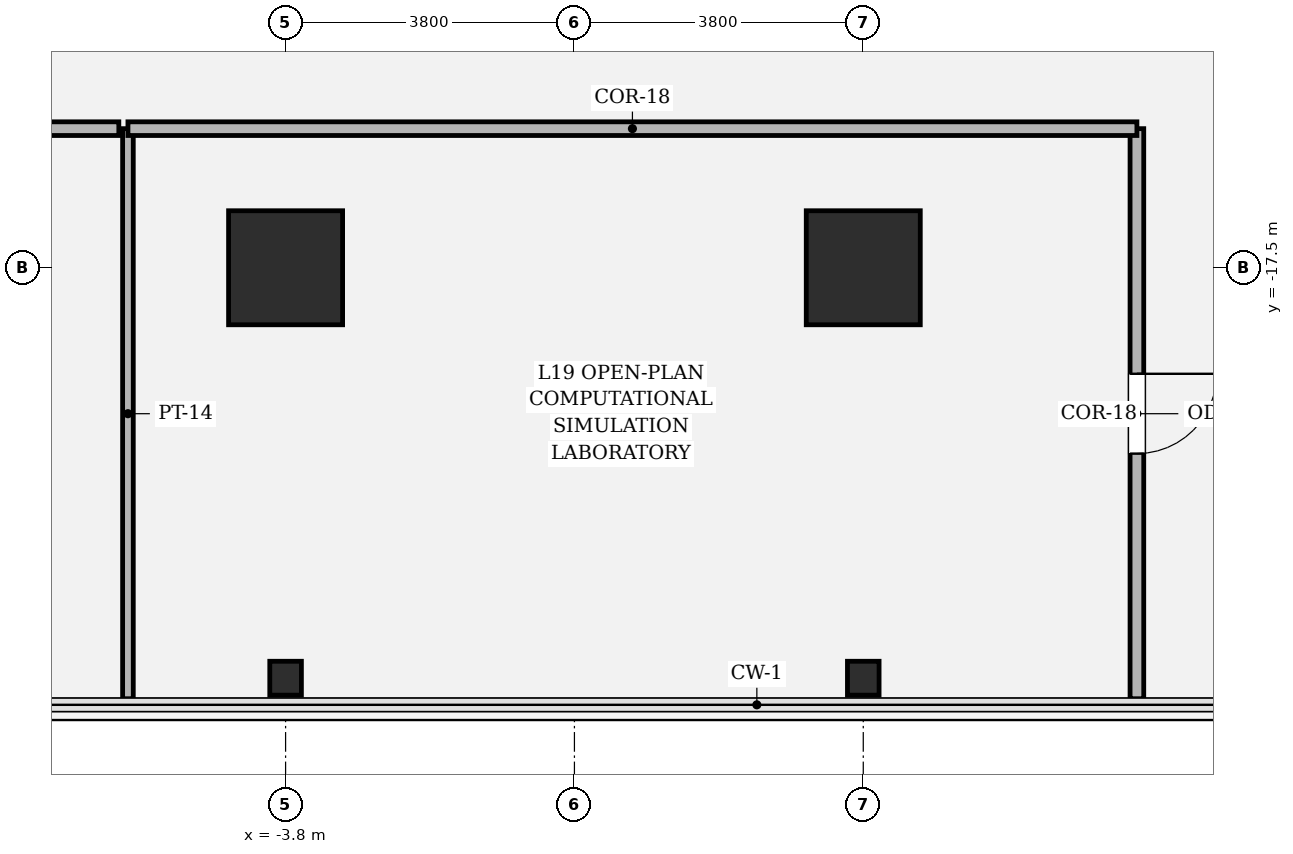
"""IFC4 building model, lengths in metres.
Left out: names, types, materials, properties, quantities, classifications, styles, units other than length and angle.
Written with IfcOpenShell. Run it as: python <this file> out.ifc"""

import sys

from ifc_helpers import new_model, si_unit, direction, frame, frame_2d, origin, origin_2d, place, context, subcontext, project, spatial, rectangle, hollow_rectangle, i_section, extrude, element, fill, save


model = new_model("IFC4")
c1 = context("Model", 3, precision=1e-05, world=origin(), true_north=direction((0.0, 1.0)))
c2 = subcontext(c1, "Body", "Model", "MODEL_VIEW")
j1 = project(units=[si_unit("LENGTHUNIT", "METRE"), si_unit("PLANEANGLEUNIT", "RADIAN")], contexts=[c1])
p1 = place(None, origin())
s1 = spatial("IfcSite", under=j1, at=p1, CompositionType="ELEMENT")
p2 = place(p1, origin())
s2 = spatial("IfcBuilding", under=s1, at=p2, CompositionType="ELEMENT")
p3 = place(p2, frame((0.0, 0.0, 84.9)))
s3 = spatial("IfcBuildingStorey", under=s2, at=p3, CompositionType="ELEMENT", Elevation=84.9)
for number, where, z_axis, x_axis in (
    (1, (-3.8, -17.5, 0.0), (0.0, 0.0, 1.0), (1.0, 0.0, 0.0)),
    (2, (3.8, -17.5, 0.0), (0.0, 0.0, 1.0), (1.0, 0.0, 0.0)),
):
    element("IfcColumn", number, at=place(p3, frame(where, z_axis=z_axis, x_axis=x_axis)), inside=s3, PredefinedType="COLUMN", context=c2, shape_type="SweptSolid", body=[
        extrude(hollow_rectangle(XDim=1.5, YDim=1.5, WallThickness=0.045, at=origin_2d()), origin(), (0.0, 0.0, 1.0), 4.05),
    ])
for number, where, z_axis, x_axis in (
    (3, (-3.8, -22.9, 0.0), (0.0, 0.0, 1.0), (1.0, 0.0, 0.0)),
    (4, (3.8, -22.9, 0.0), (0.0, 0.0, 1.0), (1.0, 0.0, 0.0)),
):
    element("IfcColumn", number, at=place(p3, frame(where, z_axis=z_axis, x_axis=x_axis)), inside=s3, PredefinedType="COLUMN", context=c2, shape_type="SweptSolid", body=[
        extrude(i_section(OverallWidth=0.416, OverallDepth=0.446, WebThickness=0.039, FlangeThickness=0.062, FilletRadius=0.018, at=origin_2d()), origin(), (0.0, 0.0, 1.0), 4.048),
    ])
p4 = place(p3, frame((7.4, -15.67, 0.0), z_axis=(0.0, 0.0, 1.0), x_axis=(0.0, -1.0, 0.0)))
e5 = element("IfcWall", 5, at=p4, inside=s3, PredefinedType="PARTITIONING", context=c2, shape_type="SweptSolid", body=[
    extrude(rectangle(XDim=7.5, YDim=0.18, at=frame_2d((3.75, 0.0))), origin(), (0.0, 0.0, 1.0), 2.524),
])
p5 = place(p4, frame((3.225, 0.0, 0.0)))
e6 = element("IfcOpeningElement", 6, at=p5, cuts=e5, PredefinedType="OPENING", context=c2, shape_type="SweptSolid", body=[
    extrude(rectangle(XDim=1.05, YDim=2.2, at=frame_2d((0.525, 1.1))), frame((0.0, 0.1, 0.0), z_axis=(0.0, -1.0, 0.0), x_axis=(1.0, 0.0, 0.0)), (0.0, 0.0, 1.0), 0.2),
])
p6 = place(p3, frame((-5.874, -23.17, 0.0), z_axis=(0.0, 0.0, 1.0), x_axis=(0.0, 1.0, 0.0)))
e7 = element("IfcWall", 7, at=p6, inside=s3, PredefinedType="PARTITIONING", context=c2, shape_type="SweptSolid", body=[
    extrude(rectangle(XDim=7.5, YDim=0.14, at=frame_2d((3.75, 0.0))), origin(), (0.0, 0.0, 1.0), 2.524),
])
p7 = place(p3, frame((-5.874, -15.67, 0.0), z_axis=(0.0, 0.0, 1.0), x_axis=(1.0, 0.0, 0.0)))
e8 = element("IfcWall", 8, at=p7, inside=s3, PredefinedType="PARTITIONING", context=c2, shape_type="SweptSolid", body=[
    extrude(rectangle(XDim=13.274, YDim=0.18, at=frame_2d((6.637, 0.0))), origin(), (0.0, 0.0, 1.0), 3.104),
])
p8 = place(p3, frame((-12.77, -15.67, 0.0), z_axis=(0.0, 0.0, 1.0), x_axis=(1.0, 0.0, 0.0)))
e9 = element("IfcWall", 9, at=p8, inside=s3, PredefinedType="PARTITIONING", context=c2, shape_type="SweptSolid", body=[
    extrude(rectangle(XDim=6.776, YDim=0.18, at=frame_2d((3.388, 0.0))), origin(), (0.0, 0.0, 1.0), 3.104),
])
p9 = place(p8, frame((2.863, 0.0, 0.0)))
e10 = element("IfcOpeningElement", 10, at=p9, cuts=e9, PredefinedType="OPENING", context=c2, shape_type="SweptSolid", body=[
    extrude(rectangle(XDim=1.05, YDim=2.2, at=frame_2d((0.525, 1.1))), frame((0.0, 0.1, 0.0), z_axis=(0.0, -1.0, 0.0), x_axis=(1.0, 0.0, 0.0)), (0.0, 0.0, 1.0), 0.2),
])
p10 = place(p5, origin())
e11 = element("IfcDoor", 11, at=p10, inside=s3, OperationType="SINGLE_SWING_LEFT", PredefinedType="DOOR", context=c2, shape_type="SweptSolid", body=[
    extrude(rectangle(XDim=1.05, YDim=2.2, at=frame_2d((0.525, 1.1))), frame((0.0, 0.025, 0.0), z_axis=(0.0, -1.0, 0.0), x_axis=(1.0, 0.0, 0.0)), (0.0, 0.0, 1.0), 0.05),
])
fill(e6, e11)
save(model, sys.argv[1])
